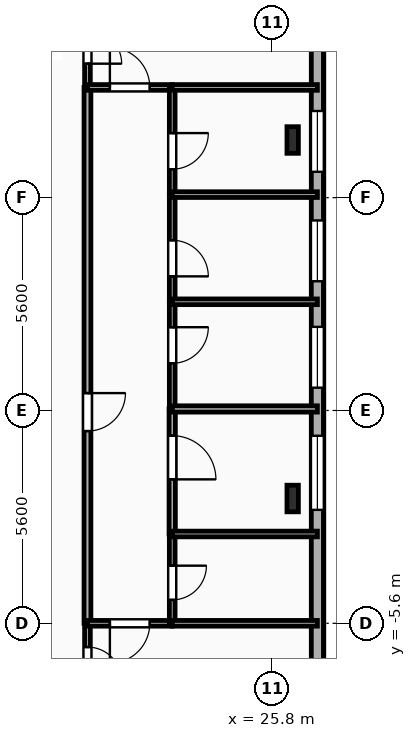
"""IFC4 building model, lengths in metres.
Left out: names, types, materials, properties, quantities, classifications, styles, units other than length and angle.
Written with IfcOpenShell. Run it as: python <this file> out.ifc"""

import sys

from ifc_helpers import new_model, si_unit, direction, frame, frame_2d, origin, origin_2d, place, context, subcontext, project, spatial, rectangle, i_section, extrude, element, fill, save


model = new_model("IFC4")
c1 = context("Model", 3, precision=1e-05, world=origin(), true_north=direction((0.0, 1.0)))
c2 = subcontext(c1, "Body", "Model", "MODEL_VIEW")
j1 = project(units=[si_unit("LENGTHUNIT", "METRE"), si_unit("PLANEANGLEUNIT", "RADIAN")], contexts=[c1])
p1 = place(None, origin())
s1 = spatial("IfcSite", under=j1, at=p1, CompositionType="ELEMENT")
p2 = place(p1, origin())
s2 = spatial("IfcBuilding", under=s1, at=p2, CompositionType="ELEMENT")
p3 = place(p2, frame((0.0, 0.0, 161.15)))
s3 = spatial("IfcBuildingStorey", under=s2, at=p3, CompositionType="ELEMENT", Elevation=161.15)
for number, where, z_axis, x_axis in (
    (1, (26.35, -2.317, 0.0), (0.0, 0.0, 1.0), (1.0, 0.0, 0.0)),
    (2, (26.35, 7.117, 0.0), (0.0, 0.0, 1.0), (1.0, 0.0, 0.0)),
):
    element("IfcColumn", number, at=place(p3, frame(where, z_axis=z_axis, x_axis=x_axis)), inside=s3, PredefinedType="COLUMN", context=c2, shape_type="SweptSolid", body=[
        extrude(i_section(OverallWidth=0.3, OverallDepth=0.7, WebThickness=0.017, FlangeThickness=0.032, FilletRadius=0.027, at=origin_2d()), origin(), (0.0, 0.0, 1.0), 3.35),
    ])
p4 = place(p3, frame((27.0, 17.2, 0.0), z_axis=(0.0, 0.0, 1.0), x_axis=(0.0, -1.0, 0.0)))
e3 = element("IfcWall", 3, at=p4, inside=s3, PredefinedType="SOLIDWALL", context=c2, shape_type="SweptSolid", body=[
    extrude(rectangle(XDim=29.6, YDim=0.32, at=frame_2d((14.8, 0.0))), origin(), (0.0, 0.0, 1.0), 3.04),
])
p5 = place(p4, frame((3.775, 0.0, 0.85)))
e4 = element("IfcOpeningElement", 4, at=p5, cuts=e3, PredefinedType="OPENING", context=c2, shape_type="SweptSolid", body=[
    extrude(rectangle(XDim=1.65, YDim=1.85, at=frame_2d((0.825, 0.925))), frame((0.0, 0.17, 0.0), z_axis=(0.0, -1.0, 0.0), x_axis=(1.0, 0.0, 0.0)), (0.0, 0.0, 1.0), 0.34),
])
p6 = place(p4, frame((9.32, 0.0, 0.85)))
e5 = element("IfcOpeningElement", 5, at=p6, cuts=e3, PredefinedType="OPENING", context=c2, shape_type="SweptSolid", body=[
    extrude(rectangle(XDim=1.6, YDim=1.85, at=frame_2d((0.8, 0.925))), frame((0.0, 0.17, 0.0), z_axis=(0.0, -1.0, 0.0), x_axis=(1.0, 0.0, 0.0)), (0.0, 0.0, 1.0), 0.34),
])
p7 = place(p4, frame((12.2, 0.0, 0.85)))
e6 = element("IfcOpeningElement", 6, at=p7, cuts=e3, PredefinedType="OPENING", context=c2, shape_type="SweptSolid", body=[
    extrude(rectangle(XDim=1.6, YDim=1.85, at=frame_2d((0.8, 0.925))), frame((0.0, 0.17, 0.0), z_axis=(0.0, -1.0, 0.0), x_axis=(1.0, 0.0, 0.0)), (0.0, 0.0, 1.0), 0.34),
])
p8 = place(p4, frame((15.0, 0.0, 0.85)))
e7 = element("IfcOpeningElement", 7, at=p8, cuts=e3, PredefinedType="OPENING", context=c2, shape_type="SweptSolid", body=[
    extrude(rectangle(XDim=1.6, YDim=1.85, at=frame_2d((0.8, 0.925))), frame((0.0, 0.17, 0.0), z_axis=(0.0, -1.0, 0.0), x_axis=(1.0, 0.0, 0.0)), (0.0, 0.0, 1.0), 0.34),
])
p9 = place(p4, frame((17.865, 0.0, 0.85)))
e8 = element("IfcOpeningElement", 8, at=p9, cuts=e3, PredefinedType="OPENING", context=c2, shape_type="SweptSolid", body=[
    extrude(rectangle(XDim=1.95, YDim=1.85, at=frame_2d((0.975, 0.925))), frame((0.0, 0.17, 0.0), z_axis=(0.0, -1.0, 0.0), x_axis=(1.0, 0.0, 0.0)), (0.0, 0.0, 1.0), 0.34),
])
p10 = place(p4, frame((25.175, 0.0, 0.85)))
e9 = element("IfcOpeningElement", 9, at=p10, cuts=e3, PredefinedType="OPENING", context=c2, shape_type="SweptSolid", body=[
    extrude(rectangle(XDim=1.65, YDim=1.85, at=frame_2d((0.825, 0.925))), frame((0.0, 0.17, 0.0), z_axis=(0.0, -1.0, 0.0), x_axis=(1.0, 0.0, 0.0)), (0.0, 0.0, 1.0), 0.34),
])
p11 = place(p3, frame((20.95, 10.65, 0.0), z_axis=(0.0, 0.0, 1.0), x_axis=(0.0, -1.0, 0.0)))
e10 = element("IfcWall", 10, at=p11, inside=s3, PredefinedType="PARTITIONING", context=c2, shape_type="SweptSolid", body=[
    extrude(rectangle(XDim=2.15, YDim=0.15, at=frame_2d((1.075, 0.0))), origin(), (0.0, 0.0, 1.0), 3.04),
])
p12 = place(p11, frame((0.625, 0.0, 0.0)))
e11 = element("IfcOpeningElement", 11, at=p12, cuts=e10, PredefinedType="OPENING", context=c2, shape_type="SweptSolid", body=[
    extrude(rectangle(XDim=0.9, YDim=2.1, at=frame_2d((0.45, 1.05))), frame((0.0, 0.085, 0.0), z_axis=(0.0, -1.0, 0.0), x_axis=(1.0, 0.0, 0.0)), (0.0, 0.0, 1.0), 0.17),
])
p13 = place(p3, frame((20.95, -5.6, 0.0), z_axis=(0.0, 0.0, 1.0), x_axis=(0.0, -1.0, 0.0)))
e12 = element("IfcWall", 12, at=p13, inside=s3, PredefinedType="PARTITIONING", context=c2, shape_type="SweptSolid", body=[
    extrude(rectangle(XDim=2.15, YDim=0.15, at=frame_2d((1.075, 0.0))), origin(), (0.0, 0.0, 1.0), 3.04),
])
p14 = place(p13, frame((0.625, 0.0, 0.0)))
e13 = element("IfcOpeningElement", 13, at=p14, cuts=e12, PredefinedType="OPENING", context=c2, shape_type="SweptSolid", body=[
    extrude(rectangle(XDim=0.9, YDim=2.1, at=frame_2d((0.45, 1.05))), frame((0.0, 0.085, 0.0), z_axis=(0.0, -1.0, 0.0), x_axis=(1.0, 0.0, 0.0)), (0.0, 0.0, 1.0), 0.17),
])
p15 = place(p3, frame((20.95, 8.5, 0.0), z_axis=(0.0, 0.0, 1.0), x_axis=(0.0, -1.0, 0.0)))
e14 = element("IfcWall", 14, at=p15, inside=s3, PredefinedType="PARTITIONING", context=c2, shape_type="SweptSolid", body=[
    extrude(rectangle(XDim=14.1, YDim=0.18, at=frame_2d((7.05, 0.0))), origin(), (0.0, 0.0, 1.0), 3.04),
])
p16 = place(p15, frame((8.042, 0.0, 0.0)))
e15 = element("IfcOpeningElement", 15, at=p16, cuts=e14, PredefinedType="OPENING", context=c2, shape_type="SweptSolid", body=[
    extrude(rectangle(XDim=1.0, YDim=2.15, at=frame_2d((0.5, 1.075))), frame((0.0, 0.1, 0.0), z_axis=(0.0, -1.0, 0.0), x_axis=(1.0, 0.0, 0.0)), (0.0, 0.0, 1.0), 0.2),
])
p17 = place(p3, frame((20.95, 8.5, 0.0), z_axis=(0.0, 0.0, 1.0), x_axis=(1.0, 0.0, 0.0)))
e16 = element("IfcWall", 16, at=p17, inside=s3, PredefinedType="PARTITIONING", context=c2, shape_type="SweptSolid", body=[
    extrude(rectangle(XDim=2.23, YDim=0.15, at=frame_2d((1.115, 0.0))), origin(), (0.0, 0.0, 1.0), 3.04),
])
p18 = place(p17, frame((0.59, 0.0, 0.0)))
e17 = element("IfcOpeningElement", 17, at=p18, cuts=e16, PredefinedType="OPENING", context=c2, shape_type="SweptSolid", body=[
    extrude(rectangle(XDim=1.05, YDim=2.15, at=frame_2d((0.525, 1.075))), frame((0.0, 0.085, 0.0), z_axis=(0.0, -1.0, 0.0), x_axis=(1.0, 0.0, 0.0)), (0.0, 0.0, 1.0), 0.17),
])
p19 = place(p3, frame((23.18, -5.6, 0.0), z_axis=(0.0, 0.0, 1.0), x_axis=(-1.0, 0.0, 0.0)))
e18 = element("IfcWall", 18, at=p19, inside=s3, PredefinedType="PARTITIONING", context=c2, shape_type="SweptSolid", body=[
    extrude(rectangle(XDim=2.23, YDim=0.15, at=frame_2d((1.115, 0.0))), origin(), (0.0, 0.0, 1.0), 3.04),
])
p20 = place(p19, frame((0.59, 0.0, 0.0)))
e19 = element("IfcOpeningElement", 19, at=p20, cuts=e18, PredefinedType="OPENING", context=c2, shape_type="SweptSolid", body=[
    extrude(rectangle(XDim=1.05, YDim=2.15, at=frame_2d((0.525, 1.075))), frame((0.0, 0.085, 0.0), z_axis=(0.0, -1.0, 0.0), x_axis=(1.0, 0.0, 0.0)), (0.0, 0.0, 1.0), 0.17),
])
p21 = place(p3, frame((23.18, -3.25, 0.0), z_axis=(0.0, 0.0, 1.0), x_axis=(0.0, -1.0, 0.0)))
e20 = element("IfcWall", 20, at=p21, inside=s3, PredefinedType="PLUMBINGWALL", context=c2, shape_type="SweptSolid", body=[
    extrude(rectangle(XDim=2.35, YDim=0.15, at=frame_2d((1.175, 0.0))), origin(), (0.0, 0.0, 1.0), 3.04),
])
p22 = place(p21, frame((0.834, 0.0, 0.0)))
e21 = element("IfcOpeningElement", 21, at=p22, cuts=e20, PredefinedType="OPENING", context=c2, shape_type="SweptSolid", body=[
    extrude(rectangle(XDim=0.9, YDim=2.1, at=frame_2d((0.45, 1.05))), frame((0.0, 0.085, 0.0), z_axis=(0.0, -1.0, 0.0), x_axis=(1.0, 0.0, 0.0)), (0.0, 0.0, 1.0), 0.17),
])
p23 = place(p3, frame((23.18, 0.04, 0.0), z_axis=(0.0, 0.0, 1.0), x_axis=(0.0, -1.0, 0.0)))
e22 = element("IfcWall", 22, at=p23, inside=s3, PredefinedType="PARTITIONING", context=c2, shape_type="SweptSolid", body=[
    extrude(rectangle(XDim=3.29, YDim=0.165, at=frame_2d((1.645, 0.0))), origin(), (0.0, 0.0, 1.0), 3.04),
])
p24 = place(p23, frame((0.702, 0.0, 0.0)))
e23 = element("IfcOpeningElement", 23, at=p24, cuts=e22, PredefinedType="OPENING", context=c2, shape_type="SweptSolid", body=[
    extrude(rectangle(XDim=1.15, YDim=2.15, at=frame_2d((0.575, 1.075))), frame((0.0, 0.093, 0.0), z_axis=(0.0, -1.0, 0.0), x_axis=(1.0, 0.0, 0.0)), (0.0, 0.0, 1.0), 0.185),
])
p25 = place(p3, frame((23.18, 2.86, 0.0), z_axis=(0.0, 0.0, 1.0), x_axis=(0.0, -1.0, 0.0)))
e24 = element("IfcWall", 24, at=p25, inside=s3, PredefinedType="PARTITIONING", context=c2, shape_type="SweptSolid", body=[
    extrude(rectangle(XDim=2.82, YDim=0.15, at=frame_2d((1.41, 0.0))), origin(), (0.0, 0.0, 1.0), 3.04),
])
p26 = place(p25, frame((0.669, 0.0, 0.0)))
e25 = element("IfcOpeningElement", 25, at=p26, cuts=e24, PredefinedType="OPENING", context=c2, shape_type="SweptSolid", body=[
    extrude(rectangle(XDim=0.95, YDim=2.1, at=frame_2d((0.475, 1.05))), frame((0.0, 0.085, 0.0), z_axis=(0.0, -1.0, 0.0), x_axis=(1.0, 0.0, 0.0)), (0.0, 0.0, 1.0), 0.17),
])
p27 = place(p3, frame((23.18, 5.68, 0.0), z_axis=(0.0, 0.0, 1.0), x_axis=(0.0, -1.0, 0.0)))
e26 = element("IfcWall", 26, at=p27, inside=s3, PredefinedType="PARTITIONING", context=c2, shape_type="SweptSolid", body=[
    extrude(rectangle(XDim=2.82, YDim=0.15, at=frame_2d((1.41, 0.0))), origin(), (0.0, 0.0, 1.0), 3.04),
])
p28 = place(p27, frame((1.201, 0.0, 0.0)))
e27 = element("IfcOpeningElement", 27, at=p28, cuts=e26, PredefinedType="OPENING", context=c2, shape_type="SweptSolid", body=[
    extrude(rectangle(XDim=0.95, YDim=2.1, at=frame_2d((0.475, 1.05))), frame((0.0, 0.085, 0.0), z_axis=(0.0, -1.0, 0.0), x_axis=(1.0, 0.0, 0.0)), (0.0, 0.0, 1.0), 0.17),
])
p29 = place(p3, frame((23.18, 8.5, 0.0), z_axis=(0.0, 0.0, 1.0), x_axis=(0.0, -1.0, 0.0)))
e28 = element("IfcWall", 28, at=p29, inside=s3, PredefinedType="PARTITIONING", context=c2, shape_type="SweptSolid", body=[
    extrude(rectangle(XDim=2.82, YDim=0.15, at=frame_2d((1.41, 0.0))), origin(), (0.0, 0.0, 1.0), 3.04),
])
p30 = place(p29, frame((1.201, 0.0, 0.0)))
e29 = element("IfcOpeningElement", 29, at=p30, cuts=e28, PredefinedType="OPENING", context=c2, shape_type="SweptSolid", body=[
    extrude(rectangle(XDim=0.95, YDim=2.1, at=frame_2d((0.475, 1.05))), frame((0.0, 0.085, 0.0), z_axis=(0.0, -1.0, 0.0), x_axis=(1.0, 0.0, 0.0)), (0.0, 0.0, 1.0), 0.17),
])
p31 = place(p3, frame((27.0, 8.5, 0.0), z_axis=(0.0, 0.0, 1.0), x_axis=(-1.0, 0.0, 0.0)))
e30 = element("IfcWall", 30, at=p31, inside=s3, PredefinedType="PARTITIONING", context=c2, shape_type="SweptSolid", body=[
    extrude(rectangle(XDim=3.82, YDim=0.15, at=frame_2d((1.91, 0.0))), origin(), (0.0, 0.0, 1.0), 3.04),
])
for number, where, z_axis, x_axis in (
    (31, (23.18, -5.6, 0.0), (0.0, 0.0, 1.0), (1.0, 0.0, 0.0)),
    (32, (23.18, -3.25, 0.0), (0.0, 0.0, 1.0), (1.0, 0.0, 0.0)),
):
    element("IfcWall", number, at=place(p3, frame(where, z_axis=z_axis, x_axis=x_axis)), inside=s3, PredefinedType="PLUMBINGWALL", context=c2, shape_type="SweptSolid", body=[
        extrude(rectangle(XDim=3.82, YDim=0.15, at=frame_2d((1.91, 0.0))), origin(), (0.0, 0.0, 1.0), 3.04),
    ])
p32 = place(p3, frame((23.18, 0.04, 0.0), z_axis=(0.0, 0.0, 1.0), x_axis=(1.0, 0.0, 0.0)))
e33 = element("IfcWall", 33, at=p32, inside=s3, PredefinedType="PARTITIONING", context=c2, shape_type="SweptSolid", body=[
    extrude(rectangle(XDim=3.82, YDim=0.165, at=frame_2d((1.91, 0.0))), origin(), (0.0, 0.0, 1.0), 3.04),
])
for number, where, z_axis, x_axis in (
    (34, (23.18, 2.86, 0.0), (0.0, 0.0, 1.0), (1.0, 0.0, 0.0)),
    (35, (23.18, 5.68, 0.0), (0.0, 0.0, 1.0), (1.0, 0.0, 0.0)),
):
    element("IfcWall", number, at=place(p3, frame(where, z_axis=z_axis, x_axis=x_axis)), inside=s3, PredefinedType="PARTITIONING", context=c2, shape_type="SweptSolid", body=[
        extrude(rectangle(XDim=3.82, YDim=0.15, at=frame_2d((1.91, 0.0))), origin(), (0.0, 0.0, 1.0), 3.04),
    ])
p33 = place(p6, origin())
e36 = element("IfcWindow", 36, at=p33, inside=s3, PartitioningType="SINGLE_PANEL", PredefinedType="WINDOW", context=c2, shape_type="SweptSolid", body=[
    extrude(rectangle(XDim=1.6, YDim=1.85, at=frame_2d((0.8, 0.925))), frame((0.0, 0.03, 0.0), z_axis=(0.0, -1.0, 0.0), x_axis=(1.0, 0.0, 0.0)), (0.0, 0.0, 1.0), 0.06),
])
fill(e5, e36)
p34 = place(p7, origin())
e37 = element("IfcWindow", 37, at=p34, inside=s3, PartitioningType="SINGLE_PANEL", PredefinedType="WINDOW", context=c2, shape_type="SweptSolid", body=[
    extrude(rectangle(XDim=1.6, YDim=1.85, at=frame_2d((0.8, 0.925))), frame((0.0, 0.03, 0.0), z_axis=(0.0, -1.0, 0.0), x_axis=(1.0, 0.0, 0.0)), (0.0, 0.0, 1.0), 0.06),
])
fill(e6, e37)
p35 = place(p8, origin())
e38 = element("IfcWindow", 38, at=p35, inside=s3, PartitioningType="SINGLE_PANEL", PredefinedType="WINDOW", context=c2, shape_type="SweptSolid", body=[
    extrude(rectangle(XDim=1.6, YDim=1.85, at=frame_2d((0.8, 0.925))), frame((0.0, 0.03, 0.0), z_axis=(0.0, -1.0, 0.0), x_axis=(1.0, 0.0, 0.0)), (0.0, 0.0, 1.0), 0.06),
])
fill(e7, e38)
p36 = place(p9, origin())
e39 = element("IfcWindow", 39, at=p36, inside=s3, PartitioningType="SINGLE_PANEL", PredefinedType="WINDOW", context=c2, shape_type="SweptSolid", body=[
    extrude(rectangle(XDim=1.95, YDim=1.85, at=frame_2d((0.975, 0.925))), frame((0.0, 0.03, 0.0), z_axis=(0.0, -1.0, 0.0), x_axis=(1.0, 0.0, 0.0)), (0.0, 0.0, 1.0), 0.06),
])
fill(e8, e39)
p37 = place(p12, origin())
e40 = element("IfcDoor", 40, at=p37, inside=s3, OperationType="SINGLE_SWING_RIGHT", PredefinedType="DOOR", context=c2, shape_type="SweptSolid", body=[
    extrude(rectangle(XDim=0.9, YDim=2.1, at=frame_2d((0.45, 1.05))), frame((0.0, 0.025, 0.0), z_axis=(0.0, -1.0, 0.0), x_axis=(1.0, 0.0, 0.0)), (0.0, 0.0, 1.0), 0.05),
])
fill(e11, e40)
p38 = place(p14, origin())
e41 = element("IfcDoor", 41, at=p38, inside=s3, OperationType="SINGLE_SWING_RIGHT", PredefinedType="DOOR", context=c2, shape_type="SweptSolid", body=[
    extrude(rectangle(XDim=0.9, YDim=2.1, at=frame_2d((0.45, 1.05))), frame((0.0, 0.025, 0.0), z_axis=(0.0, -1.0, 0.0), x_axis=(1.0, 0.0, 0.0)), (0.0, 0.0, 1.0), 0.05),
])
fill(e13, e41)
p39 = place(p16, origin())
e42 = element("IfcDoor", 42, at=p39, inside=s3, OperationType="SINGLE_SWING_LEFT", PredefinedType="DOOR", context=c2, shape_type="SweptSolid", body=[
    extrude(rectangle(XDim=1.0, YDim=2.15, at=frame_2d((0.5, 1.075))), frame((0.0, 0.025, 0.0), z_axis=(0.0, -1.0, 0.0), x_axis=(1.0, 0.0, 0.0)), (0.0, 0.0, 1.0), 0.05),
])
fill(e15, e42)
p40 = place(p18, origin())
e43 = element("IfcDoor", 43, at=p40, inside=s3, OperationType="SINGLE_SWING_LEFT", PredefinedType="DOOR", context=c2, shape_type="SweptSolid", body=[
    extrude(rectangle(XDim=1.05, YDim=2.15, at=frame_2d((0.525, 1.075))), frame((0.0, 0.025, 0.0), z_axis=(0.0, -1.0, 0.0), x_axis=(1.0, 0.0, 0.0)), (0.0, 0.0, 1.0), 0.05),
])
fill(e17, e43)
p41 = place(p20, origin())
e44 = element("IfcDoor", 44, at=p41, inside=s3, OperationType="SINGLE_SWING_RIGHT", PredefinedType="DOOR", context=c2, shape_type="SweptSolid", body=[
    extrude(rectangle(XDim=1.05, YDim=2.15, at=frame_2d((0.525, 1.075))), frame((0.0, 0.025, 0.0), z_axis=(0.0, -1.0, 0.0), x_axis=(1.0, 0.0, 0.0)), (0.0, 0.0, 1.0), 0.05),
])
fill(e19, e44)
p42 = place(p22, origin())
e45 = element("IfcDoor", 45, at=p42, inside=s3, OperationType="SINGLE_SWING_LEFT", PredefinedType="DOOR", context=c2, shape_type="SweptSolid", body=[
    extrude(rectangle(XDim=0.9, YDim=2.1, at=frame_2d((0.45, 1.05))), frame((0.0, 0.025, 0.0), z_axis=(0.0, -1.0, 0.0), x_axis=(1.0, 0.0, 0.0)), (0.0, 0.0, 1.0), 0.05),
])
fill(e21, e45)
p43 = place(p24, origin())
e46 = element("IfcDoor", 46, at=p43, inside=s3, OperationType="SINGLE_SWING_RIGHT", PredefinedType="DOOR", context=c2, shape_type="SweptSolid", body=[
    extrude(rectangle(XDim=1.15, YDim=2.15, at=frame_2d((0.575, 1.075))), frame((0.0, 0.025, 0.0), z_axis=(0.0, -1.0, 0.0), x_axis=(1.0, 0.0, 0.0)), (0.0, 0.0, 1.0), 0.05),
])
fill(e23, e46)
p44 = place(p26, origin())
e47 = element("IfcDoor", 47, at=p44, inside=s3, OperationType="SINGLE_SWING_LEFT", PredefinedType="DOOR", context=c2, shape_type="SweptSolid", body=[
    extrude(rectangle(XDim=0.95, YDim=2.1, at=frame_2d((0.475, 1.05))), frame((0.0, 0.025, 0.0), z_axis=(0.0, -1.0, 0.0), x_axis=(1.0, 0.0, 0.0)), (0.0, 0.0, 1.0), 0.05),
])
fill(e25, e47)
p45 = place(p28, origin())
e48 = element("IfcDoor", 48, at=p45, inside=s3, OperationType="SINGLE_SWING_RIGHT", PredefinedType="DOOR", context=c2, shape_type="SweptSolid", body=[
    extrude(rectangle(XDim=0.95, YDim=2.1, at=frame_2d((0.475, 1.05))), frame((0.0, 0.025, 0.0), z_axis=(0.0, -1.0, 0.0), x_axis=(1.0, 0.0, 0.0)), (0.0, 0.0, 1.0), 0.05),
])
fill(e27, e48)
p46 = place(p30, origin())
e49 = element("IfcDoor", 49, at=p46, inside=s3, OperationType="SINGLE_SWING_LEFT", PredefinedType="DOOR", context=c2, shape_type="SweptSolid", body=[
    extrude(rectangle(XDim=0.95, YDim=2.1, at=frame_2d((0.475, 1.05))), frame((0.0, 0.025, 0.0), z_axis=(0.0, -1.0, 0.0), x_axis=(1.0, 0.0, 0.0)), (0.0, 0.0, 1.0), 0.05),
])
fill(e29, e49)
save(model, sys.argv[1])
